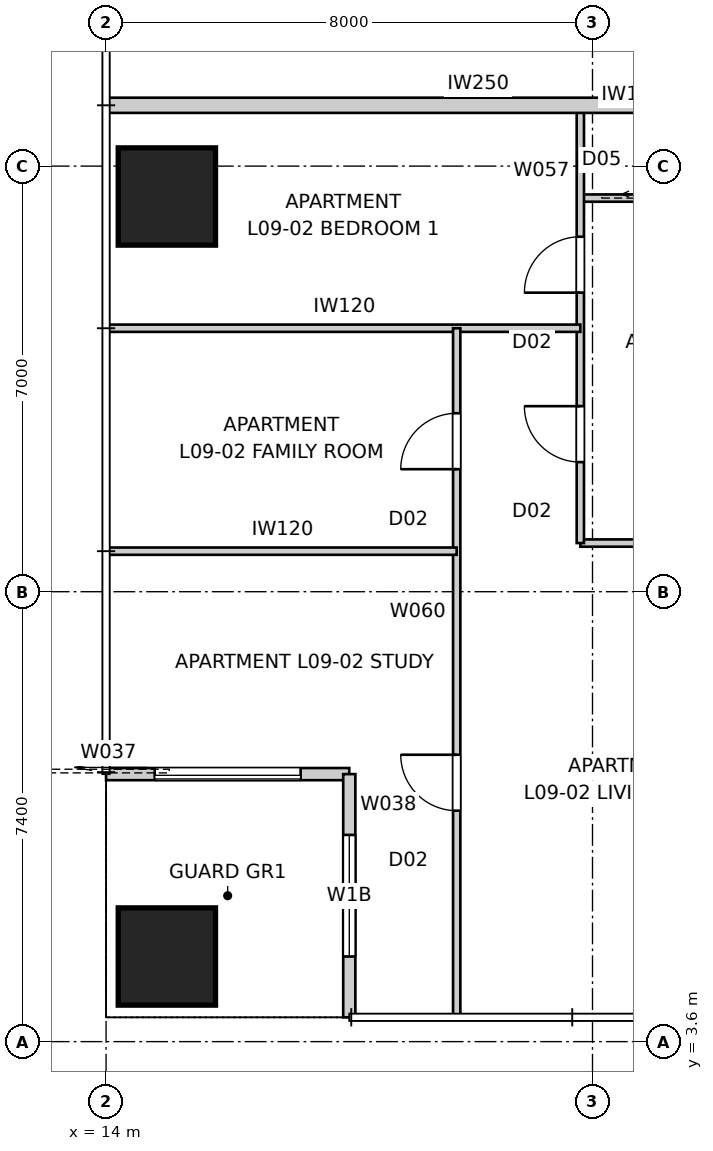
"""IFC4 building model, lengths in metres.
Left out: names, types, materials, properties, quantities, classifications, styles, units other than length and angle.
Written with IfcOpenShell. Run it as: python <this file> out.ifc"""

import sys

from ifc_helpers import new_model, si_unit, direction, frame, frame_2d, origin, origin_2d, place, context, subcontext, project, spatial, rectangle, extrude, element, fill, save


model = new_model("IFC4")
c1 = context("Model", 3, precision=1e-05, world=origin(), true_north=direction((0.0, 1.0)))
c2 = subcontext(c1, "Body", "Model", "MODEL_VIEW")
j1 = project(units=[si_unit("LENGTHUNIT", "METRE"), si_unit("PLANEANGLEUNIT", "RADIAN")], contexts=[c1])
p1 = place(None, origin())
s1 = spatial("IfcSite", under=j1, at=p1, CompositionType="ELEMENT")
p2 = place(p1, origin())
s2 = spatial("IfcBuilding", under=s1, at=p2, CompositionType="ELEMENT")
p3 = place(p2, frame((0.0, 0.0, 35.4)))
s3 = spatial("IfcBuildingStorey", under=s2, at=p3, CompositionType="ELEMENT", Elevation=35.4)
for number, where, z_axis, x_axis in (
    (1, (15.0, 5.0, 0.0), (0.0, 0.0, 1.0), (1.0, 0.0, 0.0)),
    (2, (15.0, 17.5, 0.0), (0.0, 0.0, 1.0), (1.0, 0.0, 0.0)),
):
    element("IfcColumn", number, at=place(p3, frame(where, z_axis=z_axis, x_axis=x_axis)), inside=s3, PredefinedType="COLUMN", context=c2, shape_type="SweptSolid", body=[
        extrude(rectangle(XDim=1.6, YDim=1.6, at=origin_2d()), origin(), (0.0, 0.0, 1.0), 3.4),
    ])
p4 = place(p3, frame((14.0, 8.0, 0.0), z_axis=(0.0, 0.0, 1.0), x_axis=(1.0, 0.0, 0.0)))
e3 = element("IfcWall", 3, at=p4, inside=s3, PredefinedType="SOLIDWALL", context=c2, shape_type="SweptSolid", body=[
    extrude(rectangle(XDim=4.0, YDim=0.2, at=frame_2d((2.0, 0.0))), origin(), (0.0, 0.0, 1.0), 3.25),
])
p5 = place(p4, frame((0.8, 0.0, 0.0)))
e4 = element("IfcOpeningElement", 4, at=p5, cuts=e3, PredefinedType="OPENING", context=c2, shape_type="SweptSolid", body=[
    extrude(rectangle(XDim=2.4, YDim=2.1, at=frame_2d((1.2, 1.05))), frame((0.0, 0.11, 0.0), z_axis=(0.0, -1.0, 0.0), x_axis=(1.0, 0.0, 0.0)), (0.0, 0.0, 1.0), 0.22),
])
p6 = place(p3, frame((18.0, 8.0, 0.0), z_axis=(0.0, 0.0, 1.0), x_axis=(0.0, -1.0, 0.0)))
e5 = element("IfcWall", 5, at=p6, inside=s3, PredefinedType="SOLIDWALL", context=c2, shape_type="SweptSolid", body=[
    extrude(rectangle(XDim=4.0, YDim=0.2, at=frame_2d((2.0, 0.0))), origin(), (0.0, 0.0, 1.0), 3.25),
])
p7 = place(p6, frame((1.0, 0.0, 0.45)))
e6 = element("IfcOpeningElement", 6, at=p7, cuts=e5, PredefinedType="OPENING", context=c2, shape_type="SweptSolid", body=[
    extrude(rectangle(XDim=2.0, YDim=1.8, at=frame_2d((1.0, 0.9))), frame((0.0, 0.11, 0.0), z_axis=(0.0, -1.0, 0.0), x_axis=(1.0, 0.0, 0.0)), (0.0, 0.0, 1.0), 0.22),
])
p8 = place(p3, frame((14.0, 19.0, 0.0), z_axis=(0.0, 0.0, 1.0), x_axis=(1.0, 0.0, 0.0)))
e7 = element("IfcWall", 7, at=p8, inside=s3, PredefinedType="PARTITIONING", context=c2, shape_type="SweptSolid", body=[
    extrude(rectangle(XDim=12.24, YDim=0.25, at=frame_2d((6.12, 0.0))), origin(), (0.0, 0.0, 1.0), 3.25),
])
p9 = place(p3, frame((21.8, 17.474, 0.0), z_axis=(0.0, 0.0, 1.0), x_axis=(1.0, 0.0, 0.0)))
e8 = element("IfcWall", 8, at=p9, inside=s3, PredefinedType="PARTITIONING", context=c2, shape_type="SweptSolid", body=[
    extrude(rectangle(XDim=4.4, YDim=0.12, at=frame_2d((2.2, 0.0))), origin(), (0.0, 0.0, 1.0), 3.25),
])
p10 = place(p9, frame((1.215, 0.0, 0.0)))
e9 = element("IfcOpeningElement", 9, at=p10, cuts=e8, PredefinedType="OPENING", context=c2, shape_type="SweptSolid", body=[
    extrude(rectangle(XDim=0.96, YDim=2.1, at=frame_2d((0.48, 1.05))), frame((0.0, 0.07, 0.0), z_axis=(0.0, -1.0, 0.0), x_axis=(1.0, 0.0, 0.0)), (0.0, 0.0, 1.0), 0.14),
])
p11 = place(p3, frame((25.189, 11.8, 0.0), z_axis=(0.0, 0.0, 1.0), x_axis=(-1.0, 0.0, 0.0)))
e10 = element("IfcWall", 10, at=p11, inside=s3, PredefinedType="PARTITIONING", context=c2, shape_type="SweptSolid", body=[
    extrude(rectangle(XDim=3.389, YDim=0.12, at=frame_2d((1.695, 0.0))), origin(), (0.0, 0.0, 1.0), 3.25),
])
p12 = place(p3, frame((21.8, 11.8, 0.0), z_axis=(0.0, 0.0, 1.0), x_axis=(0.0, 1.0, 0.0)))
e11 = element("IfcWall", 11, at=p12, inside=s3, PredefinedType="PARTITIONING", context=c2, shape_type="SweptSolid", body=[
    extrude(rectangle(XDim=7.2, YDim=0.12, at=frame_2d((3.6, 0.0))), origin(), (0.0, 0.0, 1.0), 3.25),
])
p13 = place(p12, frame((1.332, 0.0, 0.0)))
e12 = element("IfcOpeningElement", 12, at=p13, cuts=e11, PredefinedType="OPENING", context=c2, shape_type="SweptSolid", body=[
    extrude(rectangle(XDim=0.92, YDim=2.34, at=frame_2d((0.46, 1.17))), frame((0.0, 0.07, 0.0), z_axis=(0.0, -1.0, 0.0), x_axis=(1.0, 0.0, 0.0)), (0.0, 0.0, 1.0), 0.14),
])
p14 = place(p12, frame((4.119, 0.0, 0.0)))
e13 = element("IfcOpeningElement", 13, at=p14, cuts=e11, PredefinedType="OPENING", context=c2, shape_type="SweptSolid", body=[
    extrude(rectangle(XDim=0.92, YDim=2.34, at=frame_2d((0.46, 1.17))), frame((0.0, 0.07, 0.0), z_axis=(0.0, -1.0, 0.0), x_axis=(1.0, 0.0, 0.0)), (0.0, 0.0, 1.0), 0.14),
])
p15 = place(p3, frame((14.04, 15.333, 0.0), z_axis=(0.0, 0.0, 1.0), x_axis=(1.0, 0.0, 0.0)))
e14 = element("IfcWall", 14, at=p15, inside=s3, PredefinedType="PARTITIONING", context=c2, shape_type="SweptSolid", body=[
    extrude(rectangle(XDim=7.76, YDim=0.12, at=frame_2d((3.88, 0.0))), origin(), (0.0, 0.0, 1.0), 2.638),
])
p16 = place(p3, frame((19.767, 4.04, 0.0), z_axis=(0.0, 0.0, 1.0), x_axis=(0.0, 1.0, 0.0)))
e15 = element("IfcWall", 15, at=p16, inside=s3, PredefinedType="PARTITIONING", context=c2, shape_type="SweptSolid", body=[
    extrude(rectangle(XDim=11.293, YDim=0.12, at=frame_2d((5.646, 0.0))), origin(), (0.0, 0.0, 1.0), 3.25),
])
p17 = place(p16, frame((3.358, 0.0, 0.0)))
e16 = element("IfcOpeningElement", 16, at=p17, cuts=e15, PredefinedType="OPENING", context=c2, shape_type="SweptSolid", body=[
    extrude(rectangle(XDim=0.92, YDim=2.34, at=frame_2d((0.46, 1.17))), frame((0.0, 0.07, 0.0), z_axis=(0.0, -1.0, 0.0), x_axis=(1.0, 0.0, 0.0)), (0.0, 0.0, 1.0), 0.14),
])
p18 = place(p16, frame((8.975, 0.0, 0.0)))
e17 = element("IfcOpeningElement", 17, at=p18, cuts=e15, PredefinedType="OPENING", context=c2, shape_type="SweptSolid", body=[
    extrude(rectangle(XDim=0.92, YDim=2.34, at=frame_2d((0.46, 1.17))), frame((0.0, 0.07, 0.0), z_axis=(0.0, -1.0, 0.0), x_axis=(1.0, 0.0, 0.0)), (0.0, 0.0, 1.0), 0.14),
])
p19 = place(p3, frame((14.04, 11.667, 0.0), z_axis=(0.0, 0.0, 1.0), x_axis=(1.0, 0.0, 0.0)))
e18 = element("IfcWall", 18, at=p19, inside=s3, PredefinedType="PARTITIONING", context=c2, shape_type="SweptSolid", body=[
    extrude(rectangle(XDim=5.727, YDim=0.12, at=frame_2d((2.863, 0.0))), origin(), (0.0, 0.0, 1.0), 3.25),
])
p20 = place(p5, origin())
e19 = element("IfcDoor", 19, at=p20, inside=s3, OperationType="SLIDING_TO_LEFT", PredefinedType="DOOR", context=c2, shape_type="SweptSolid", body=[
    extrude(rectangle(XDim=2.4, YDim=2.1, at=frame_2d((1.2, 1.05))), frame((0.0, 0.025, 0.0), z_axis=(0.0, -1.0, 0.0), x_axis=(1.0, 0.0, 0.0)), (0.0, 0.0, 1.0), 0.05),
])
fill(e4, e19)
p21 = place(p7, origin())
e20 = element("IfcWindow", 20, at=p21, inside=s3, PartitioningType="SINGLE_PANEL", PredefinedType="WINDOW", context=c2, shape_type="SweptSolid", body=[
    extrude(rectangle(XDim=2.0, YDim=1.8, at=frame_2d((1.0, 0.9))), frame((0.0, 0.03, 0.0), z_axis=(0.0, -1.0, 0.0), x_axis=(1.0, 0.0, 0.0)), (0.0, 0.0, 1.0), 0.06),
])
fill(e6, e20)
p22 = place(p13, origin())
e21 = element("IfcDoor", 21, at=p22, inside=s3, OperationType="SINGLE_SWING_RIGHT", PredefinedType="DOOR", context=c2, shape_type="SweptSolid", body=[
    extrude(rectangle(XDim=0.92, YDim=2.34, at=frame_2d((0.46, 1.17))), frame((0.0, 0.025, 0.0), z_axis=(0.0, -1.0, 0.0), x_axis=(1.0, 0.0, 0.0)), (0.0, 0.0, 1.0), 0.05),
])
fill(e12, e21)
p23 = place(p14, origin())
e22 = element("IfcDoor", 22, at=p23, inside=s3, OperationType="SINGLE_SWING_LEFT", PredefinedType="DOOR", context=c2, shape_type="SweptSolid", body=[
    extrude(rectangle(XDim=0.92, YDim=2.34, at=frame_2d((0.46, 1.17))), frame((0.0, 0.025, 0.0), z_axis=(0.0, -1.0, 0.0), x_axis=(1.0, 0.0, 0.0)), (0.0, 0.0, 1.0), 0.05),
])
fill(e13, e22)
p24 = place(p17, origin())
e23 = element("IfcDoor", 23, at=p24, inside=s3, OperationType="SINGLE_SWING_RIGHT", PredefinedType="DOOR", context=c2, shape_type="SweptSolid", body=[
    extrude(rectangle(XDim=0.92, YDim=2.34, at=frame_2d((0.46, 1.17))), frame((0.0, 0.025, 0.0), z_axis=(0.0, -1.0, 0.0), x_axis=(1.0, 0.0, 0.0)), (0.0, 0.0, 1.0), 0.05),
])
fill(e16, e23)
p25 = place(p18, origin())
e24 = element("IfcDoor", 24, at=p25, inside=s3, OperationType="SINGLE_SWING_LEFT", PredefinedType="DOOR", context=c2, shape_type="SweptSolid", body=[
    extrude(rectangle(XDim=0.92, YDim=2.34, at=frame_2d((0.46, 1.17))), frame((0.0, 0.025, 0.0), z_axis=(0.0, -1.0, 0.0), x_axis=(1.0, 0.0, 0.0)), (0.0, 0.0, 1.0), 0.05),
])
fill(e17, e24)
save(model, sys.argv[1])
